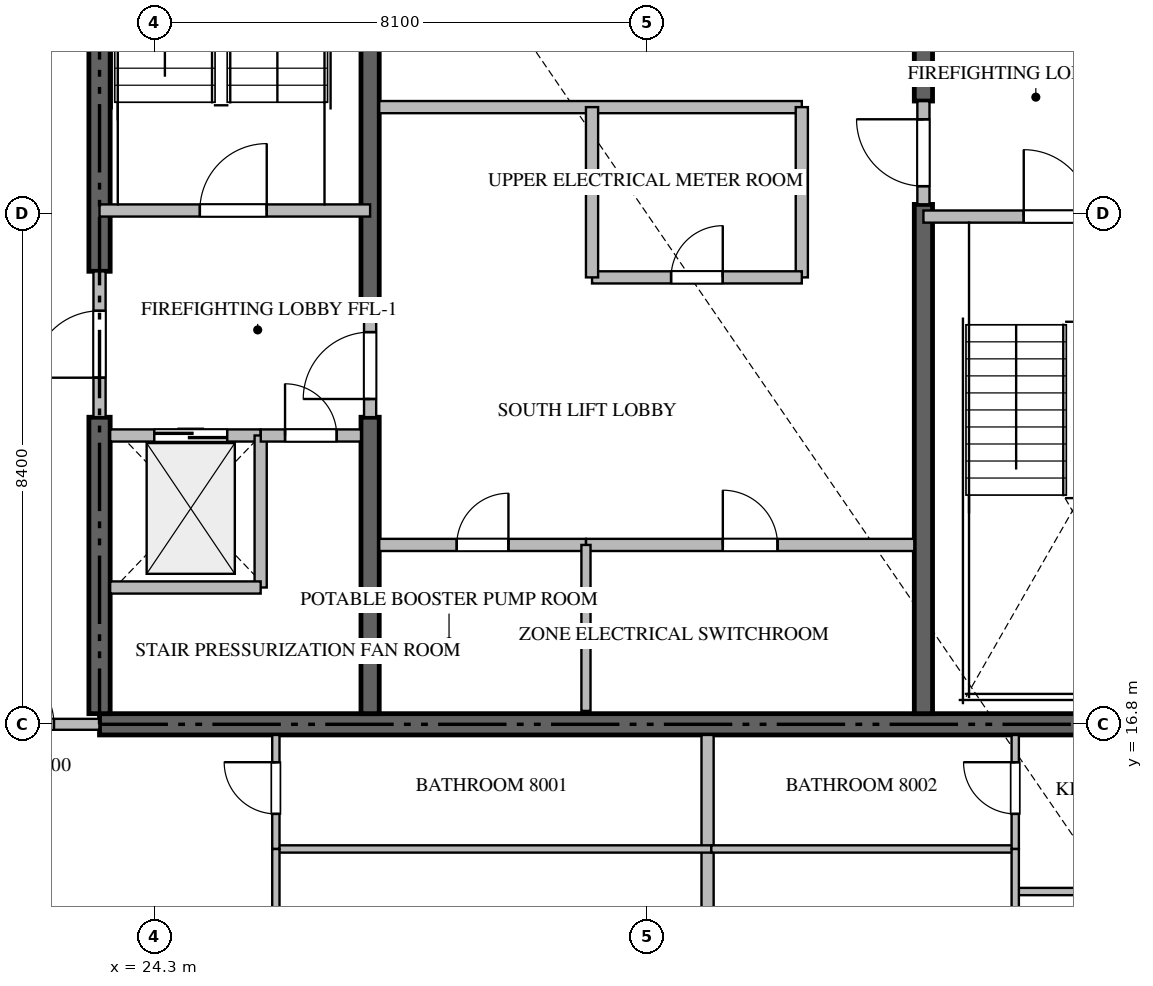
"""IFC4 building model, lengths in metres.
Left out: names, types, materials, properties, quantities, classifications, styles, units other than length and angle.
Written with IfcOpenShell. Run it as: python <this file> out.ifc"""

import sys

from ifc_helpers import new_model, si_unit, direction, frame, frame_2d, origin, place, context, subcontext, project, spatial, rectangle, extrude, source, transform, mapped, element, fill, save


model = new_model("IFC4")
c1 = context("Model", 3, precision=1e-05, world=origin(), true_north=direction((0.0, 1.0)))
c2 = subcontext(c1, "Body", "Model", "MODEL_VIEW")
j1 = project(units=[si_unit("LENGTHUNIT", "METRE"), si_unit("PLANEANGLEUNIT", "RADIAN")], contexts=[c1])
p1 = place(None, origin())
s1 = spatial("IfcSite", under=j1, at=p1, CompositionType="ELEMENT")
p2 = place(p1, origin())
s2 = spatial("IfcBuilding", under=s1, at=p2, CompositionType="ELEMENT")
p3 = place(p2, frame((0.0, 0.0, 321.8)))
s3 = spatial("IfcBuildingStorey", under=s2, at=p3, CompositionType="ELEMENT", Elevation=321.8)
p4 = place(p3, frame((23.4, 16.8, -0.26), z_axis=(0.0, 0.0, 1.0), x_axis=(1.0, 0.0, 0.0)))
e1 = element("IfcWall", 1, at=p4, inside=s3, PredefinedType="SHEAR", context=c2, shape_type="SweptSolid", body=[
    extrude(rectangle(XDim=18.0, YDim=0.35, at=frame_2d((9.0, 0.0))), origin(), (0.0, 0.0, 1.0), 4.048),
])
p5 = place(p3, frame((23.4, 16.975, -0.26), z_axis=(0.0, 0.0, 1.0), x_axis=(0.0, 1.0, 0.0)))
e2 = element("IfcWall", 2, at=p5, inside=s3, PredefinedType="SHEAR", context=c2, shape_type="SweptSolid", body=[
    extrude(rectangle(XDim=4.875, YDim=0.35, at=frame_2d((2.438, 0.0))), origin(), (0.0, 0.0, 1.0), 4.048),
])
p6 = place(p3, frame((23.4, 24.25, -0.26), z_axis=(0.0, 0.0, 1.0), x_axis=(0.0, 1.0, 0.0)))
e3 = element("IfcWall", 3, at=p6, inside=s3, PredefinedType="SHEAR", context=c2, shape_type="SweptSolid", body=[
    extrude(rectangle(XDim=9.175, YDim=0.35, at=frame_2d((4.587, 0.0))), origin(), (0.0, 0.0, 1.0), 4.048),
])
p7 = place(p3, frame((27.85, 16.975, -0.26), z_axis=(0.0, 0.0, 1.0), x_axis=(0.0, 1.0, 0.0)))
e4 = element("IfcWall", 4, at=p7, inside=s3, PredefinedType="SHEAR", context=c2, shape_type="SweptSolid", body=[
    extrude(rectangle(XDim=4.875, YDim=0.3, at=frame_2d((2.438, 0.0))), origin(), (0.0, 0.0, 1.0), 4.048),
])
p8 = place(p3, frame((27.85, 23.55, -0.26), z_axis=(0.0, 0.0, 1.0), x_axis=(0.0, 1.0, 0.0)))
e5 = element("IfcWall", 5, at=p8, inside=s3, PredefinedType="SHEAR", context=c2, shape_type="SweptSolid", body=[
    extrude(rectangle(XDim=9.875, YDim=0.3, at=frame_2d((4.938, 0.0))), origin(), (0.0, 0.0, 1.0), 4.048),
])
p9 = place(p3, frame((36.95, 16.975, -0.26), z_axis=(0.0, 0.0, 1.0), x_axis=(0.0, 1.0, 0.0)))
e6 = element("IfcWall", 6, at=p9, inside=s3, PredefinedType="SHEAR", context=c2, shape_type="SweptSolid", body=[
    extrude(rectangle(XDim=8.375, YDim=0.3, at=frame_2d((4.188, 0.0))), origin(), (0.0, 0.0, 1.0), 4.048),
])
p10 = place(p3, frame((36.95, 27.05, -0.26), z_axis=(0.0, 0.0, 1.0), x_axis=(0.0, 1.0, 0.0)))
e7 = element("IfcWall", 7, at=p10, inside=s3, PredefinedType="SHEAR", context=c2, shape_type="SweptSolid", body=[
    extrude(rectangle(XDim=6.375, YDim=0.3, at=frame_2d((3.188, 0.0))), origin(), (0.0, 0.0, 1.0), 4.048),
])
p11 = place(p3, frame((23.4, 25.25, 0.0), z_axis=(0.0, 0.0, 1.0), x_axis=(1.0, 0.0, 0.0)))
e8 = element("IfcWall", 8, at=p11, inside=s3, PredefinedType="STANDARD", context=c2, shape_type="SweptSolid", body=[
    extrude(rectangle(XDim=4.45, YDim=0.2, at=frame_2d((2.225, 0.0))), origin(), (0.0, 0.0, 1.0), 3.79),
])
p12 = place(p11, frame((1.65, 0.0, 0.0)))
e9 = element("IfcOpeningElement", 9, at=p12, cuts=e8, PredefinedType="OPENING", context=c2, shape_type="SweptSolid", body=[
    extrude(rectangle(XDim=1.1, YDim=2.15, at=frame_2d((0.55, 1.075))), frame((0.0, 0.11, 0.0), z_axis=(0.0, -1.0, 0.0), x_axis=(1.0, 0.0, 0.0)), (0.0, 0.0, 1.0), 0.22),
])
p13 = place(p3, frame((36.95, 25.15, 0.0), z_axis=(0.0, 0.0, 1.0), x_axis=(1.0, 0.0, 0.0)))
e10 = element("IfcWall", 10, at=p13, inside=s3, PredefinedType="STANDARD", context=c2, shape_type="SweptSolid", body=[
    extrude(rectangle(XDim=4.45, YDim=0.2, at=frame_2d((2.225, 0.0))), origin(), (0.0, 0.0, 1.0), 3.79),
])
p14 = place(p13, frame((1.65, 0.0, 0.0)))
e11 = element("IfcOpeningElement", 11, at=p14, cuts=e10, PredefinedType="OPENING", context=c2, shape_type="SweptSolid", body=[
    extrude(rectangle(XDim=1.1, YDim=2.15, at=frame_2d((0.55, 1.075))), frame((0.0, 0.11, 0.0), z_axis=(0.0, -1.0, 0.0), x_axis=(1.0, 0.0, 0.0)), (0.0, 0.0, 1.0), 0.22),
])
p15 = place(p3, frame((23.575, 21.55, 0.0), z_axis=(0.0, 0.0, 1.0), x_axis=(1.0, 0.0, 0.0)))
e12 = element("IfcWall", 12, at=p15, inside=s3, PredefinedType="STANDARD", context=c2, shape_type="SweptSolid", body=[
    extrude(rectangle(XDim=2.475, YDim=0.2, at=frame_2d((1.238, 0.0))), origin(), (0.0, 0.0, 1.0), 3.79),
])
p16 = place(p15, frame((0.725, 0.0, 0.0)))
e13 = element("IfcOpeningElement", 13, at=p16, cuts=e12, PredefinedType="OPENING", context=c2, shape_type="SweptSolid", body=[
    extrude(rectangle(XDim=1.2, YDim=2.2, at=frame_2d((0.6, 1.1))), frame((0.0, 0.11, 0.0), z_axis=(0.0, -1.0, 0.0), x_axis=(1.0, 0.0, 0.0)), (0.0, 0.0, 1.0), 0.22),
])
p17 = place(p3, frame((26.05, 19.05, 0.0), z_axis=(0.0, 0.0, 1.0), x_axis=(0.0, 1.0, 0.0)))
e14 = element("IfcWall", 14, at=p17, inside=s3, PredefinedType="STANDARD", context=c2, shape_type="SweptSolid", body=[
    extrude(rectangle(XDim=2.5, YDim=0.2, at=frame_2d((1.25, 0.0))), origin(), (0.0, 0.0, 1.0), 3.79),
])
p18 = place(p3, frame((23.575, 19.05, 0.0), z_axis=(0.0, 0.0, 1.0), x_axis=(1.0, 0.0, 0.0)))
e15 = element("IfcWall", 15, at=p18, inside=s3, PredefinedType="STANDARD", context=c2, shape_type="SweptSolid", body=[
    extrude(rectangle(XDim=2.475, YDim=0.2, at=frame_2d((1.238, 0.0))), origin(), (0.0, 0.0, 1.0), 3.79),
])
p19 = place(p3, frame((26.052, 21.55, 0.0), z_axis=(0.0, 0.0, 1.0), x_axis=(1.0, 0.0, 0.0)))
e16 = element("IfcWall", 16, at=p19, inside=s3, PredefinedType="STANDARD", context=c2, shape_type="SweptSolid", body=[
    extrude(rectangle(XDim=1.648, YDim=0.2, at=frame_2d((0.824, 0.0))), origin(), (0.0, 0.0, 1.0), 3.79),
])
p20 = place(p19, frame((0.399, 0.0, 0.0)))
e17 = element("IfcOpeningElement", 17, at=p20, cuts=e16, PredefinedType="OPENING", context=c2, shape_type="SweptSolid", body=[
    extrude(rectangle(XDim=0.85, YDim=2.1, at=frame_2d((0.425, 1.05))), frame((0.0, 0.11, 0.0), z_axis=(0.0, -1.0, 0.0), x_axis=(1.0, 0.0, 0.0)), (0.0, 0.0, 1.0), 0.22),
])
p21 = place(p3, frame((23.4, 21.852, 0.0), z_axis=(0.0, 0.0, 1.0), x_axis=(0.0, 1.0, 0.0)))
e18 = element("IfcWall", 18, at=p21, inside=s3, PredefinedType="STANDARD", context=c2, shape_type="SweptSolid", body=[
    extrude(rectangle(XDim=2.396, YDim=0.2, at=frame_2d((1.198, 0.0))), origin(), (0.0, 0.0, 1.0), 3.79),
])
p22 = place(p21, frame((0.648, 0.0, 0.0)))
e19 = element("IfcOpeningElement", 19, at=p22, cuts=e18, PredefinedType="OPENING", context=c2, shape_type="SweptSolid", body=[
    extrude(rectangle(XDim=1.1, YDim=2.15, at=frame_2d((0.55, 1.075))), frame((0.0, 0.11, 0.0), z_axis=(0.0, -1.0, 0.0), x_axis=(1.0, 0.0, 0.0)), (0.0, 0.0, 1.0), 0.22),
])
p23 = place(p3, frame((27.85, 21.852, 0.0), z_axis=(0.0, 0.0, 1.0), x_axis=(0.0, 1.0, 0.0)))
e20 = element("IfcWall", 20, at=p23, inside=s3, PredefinedType="STANDARD", context=c2, shape_type="SweptSolid", body=[
    extrude(rectangle(XDim=1.696, YDim=0.2, at=frame_2d((0.848, 0.0))), origin(), (0.0, 0.0, 1.0), 3.79),
])
p24 = place(p23, frame((0.298, 0.0, 0.0)))
e21 = element("IfcOpeningElement", 21, at=p24, cuts=e20, PredefinedType="OPENING", context=c2, shape_type="SweptSolid", body=[
    extrude(rectangle(XDim=1.1, YDim=2.15, at=frame_2d((0.55, 1.075))), frame((0.0, 0.11, 0.0), z_axis=(0.0, -1.0, 0.0), x_axis=(1.0, 0.0, 0.0)), (0.0, 0.0, 1.0), 0.22),
])
p25 = place(p3, frame((36.95, 25.352, 0.0), z_axis=(0.0, 0.0, 1.0), x_axis=(0.0, 1.0, 0.0)))
e22 = element("IfcWall", 22, at=p25, inside=s3, PredefinedType="STANDARD", context=c2, shape_type="SweptSolid", body=[
    extrude(rectangle(XDim=1.696, YDim=0.2, at=frame_2d((0.848, 0.0))), origin(), (0.0, 0.0, 1.0), 3.79),
])
p26 = place(p25, frame((0.298, 0.0, 0.0)))
e23 = element("IfcOpeningElement", 23, at=p26, cuts=e22, PredefinedType="OPENING", context=c2, shape_type="SweptSolid", body=[
    extrude(rectangle(XDim=1.1, YDim=2.15, at=frame_2d((0.55, 1.075))), frame((0.0, 0.11, 0.0), z_axis=(0.0, -1.0, 0.0), x_axis=(1.0, 0.0, 0.0)), (0.0, 0.0, 1.0), 0.22),
])
p27 = place(p3, frame((28.0, 19.75, 0.0), z_axis=(0.0, 0.0, 1.0), x_axis=(1.0, 0.0, 0.0)))
e24 = element("IfcWall", 24, at=p27, inside=s3, PredefinedType="STANDARD", context=c2, shape_type="SweptSolid", body=[
    extrude(rectangle(XDim=3.4, YDim=0.2, at=frame_2d((1.7, 0.0))), origin(), (0.0, 0.0, 1.0), 3.79),
])
p28 = place(p27, frame((1.275, 0.0, 0.0)))
e25 = element("IfcOpeningElement", 25, at=p28, cuts=e24, PredefinedType="OPENING", context=c2, shape_type="SweptSolid", body=[
    extrude(rectangle(XDim=0.85, YDim=2.1, at=frame_2d((0.425, 1.05))), frame((0.0, 0.11, 0.0), z_axis=(0.0, -1.0, 0.0), x_axis=(1.0, 0.0, 0.0)), (0.0, 0.0, 1.0), 0.22),
])
p29 = place(p3, frame((31.402, 19.75, 0.0), z_axis=(0.0, 0.0, 1.0), x_axis=(1.0, 0.0, 0.0)))
e26 = element("IfcWall", 26, at=p29, inside=s3, PredefinedType="STANDARD", context=c2, shape_type="SweptSolid", body=[
    extrude(rectangle(XDim=5.398, YDim=0.2, at=frame_2d((2.699, 0.0))), origin(), (0.0, 0.0, 1.0), 3.79),
])
p30 = place(p29, frame((2.249, 0.0, 0.0)))
e27 = element("IfcOpeningElement", 27, at=p30, cuts=e26, PredefinedType="OPENING", context=c2, shape_type="SweptSolid", body=[
    extrude(rectangle(XDim=0.9, YDim=2.1, at=frame_2d((0.45, 1.05))), frame((0.0, 0.11, 0.0), z_axis=(0.0, -1.0, 0.0), x_axis=(1.0, 0.0, 0.0)), (0.0, 0.0, 1.0), 0.22),
])
p31 = place(p3, frame((31.4, 17.02, 0.0), z_axis=(0.0, 0.0, 1.0), x_axis=(0.0, 1.0, 0.0)))
e28 = element("IfcWall", 28, at=p31, inside=s3, PredefinedType="PARTITIONING", context=c2, shape_type="SweptSolid", body=[
    extrude(rectangle(XDim=2.73, YDim=0.15, at=frame_2d((1.365, 0.0))), origin(), (0.0, 0.0, 1.0), 3.79),
])
p32 = place(p3, frame((28.0, 26.95, 0.0), z_axis=(0.0, 0.0, 1.0), x_axis=(1.0, 0.0, 0.0)))
e29 = element("IfcWall", 29, at=p32, inside=s3, PredefinedType="STANDARD", context=c2, shape_type="SweptSolid", body=[
    extrude(rectangle(XDim=6.95, YDim=0.2, at=frame_2d((3.475, 0.0))), origin(), (0.0, 0.0, 1.0), 3.79),
])
p33 = place(p3, frame((34.95, 24.15, 0.0), z_axis=(0.0, 0.0, 1.0), x_axis=(0.0, 1.0, 0.0)))
e30 = element("IfcWall", 30, at=p33, inside=s3, PredefinedType="STANDARD", context=c2, shape_type="SweptSolid", body=[
    extrude(rectangle(XDim=2.8, YDim=0.2, at=frame_2d((1.4, 0.0))), origin(), (0.0, 0.0, 1.0), 3.79),
])
p34 = place(p3, frame((31.5, 24.15, 0.0), z_axis=(0.0, 0.0, 1.0), x_axis=(1.0, 0.0, 0.0)))
e31 = element("IfcWall", 31, at=p34, inside=s3, PredefinedType="STANDARD", context=c2, shape_type="SweptSolid", body=[
    extrude(rectangle(XDim=3.45, YDim=0.2, at=frame_2d((1.725, 0.0))), origin(), (0.0, 0.0, 1.0), 3.79),
])
p35 = place(p34, frame((1.3, 0.0, 0.0)))
e32 = element("IfcOpeningElement", 32, at=p35, cuts=e31, PredefinedType="OPENING", context=c2, shape_type="SweptSolid", body=[
    extrude(rectangle(XDim=0.85, YDim=2.1, at=frame_2d((0.425, 1.05))), frame((0.0, 0.11, 0.0), z_axis=(0.0, -1.0, 0.0), x_axis=(1.0, 0.0, 0.0)), (0.0, 0.0, 1.0), 0.22),
])
p36 = place(p3, frame((31.5, 24.15, 0.0), z_axis=(0.0, 0.0, 1.0), x_axis=(0.0, 1.0, 0.0)))
e33 = element("IfcWall", 33, at=p36, inside=s3, PredefinedType="STANDARD", context=c2, shape_type="SweptSolid", body=[
    extrude(rectangle(XDim=2.8, YDim=0.2, at=frame_2d((1.4, 0.0))), origin(), (0.0, 0.0, 1.0), 3.79),
])
p37 = place(p3, frame((33.4, 2.482, 0.0), z_axis=(0.0, 0.0, 1.0), x_axis=(0.0, 1.0, 0.0)))
e34 = element("IfcWall", 34, at=p37, inside=s3, PredefinedType="PARTITIONING", context=c2, shape_type="SweptSolid", body=[
    extrude(rectangle(XDim=14.143, YDim=0.2, at=frame_2d((7.072, 0.0))), origin(), (0.0, 0.0, 1.0), 3.79),
])
p38 = place(p3, frame((20.902, 16.8, 0.0), z_axis=(0.0, 0.0, 1.0), x_axis=(1.0, 0.0, 0.0)))
e35 = element("IfcWall", 35, at=p38, inside=s3, PredefinedType="PARTITIONING", context=c2, shape_type="SweptSolid", body=[
    extrude(rectangle(XDim=2.496, YDim=0.18, at=frame_2d((1.248, 0.0))), origin(), (0.0, 0.0, 1.0), 3.79),
])
p39 = place(p38, frame((0.748, 0.0, 0.0)))
e36 = element("IfcOpeningElement", 36, at=p39, cuts=e35, PredefinedType="OPENING", context=c2, shape_type="SweptSolid", body=[
    extrude(rectangle(XDim=1.0, YDim=2.15, at=frame_2d((0.5, 1.075))), frame((0.0, 0.1, 0.0), z_axis=(0.0, -1.0, 0.0), x_axis=(1.0, 0.0, 0.0)), (0.0, 0.0, 1.0), 0.2),
])
p40 = place(p3, frame((26.3, 14.75, 0.0), z_axis=(0.0, 0.0, 1.0), x_axis=(1.0, 0.0, 0.0)))
e37 = element("IfcWall", 37, at=p40, inside=s3, PredefinedType="PARTITIONING", context=c2, shape_type="SweptSolid", body=[
    extrude(rectangle(XDim=7.16, YDim=0.12, at=frame_2d((3.58, 0.0))), origin(), (0.0, 0.0, 1.0), 3.79),
])
p41 = place(p3, frame((26.3, 6.78, 0.0), z_axis=(0.0, 0.0, 1.0), x_axis=(0.0, 1.0, 0.0)))
e38 = element("IfcWall", 38, at=p41, inside=s3, PredefinedType="PARTITIONING", context=c2, shape_type="SweptSolid", body=[
    extrude(rectangle(XDim=7.97, YDim=0.12, at=frame_2d((3.985, 0.0))), origin(), (0.0, 0.0, 1.0), 3.79),
])
p42 = place(p41, frame((3.56, 0.0, 0.0)))
e39 = element("IfcOpeningElement", 39, at=p42, cuts=e38, PredefinedType="OPENING", context=c2, shape_type="SweptSolid", body=[
    extrude(rectangle(XDim=0.85, YDim=2.1, at=frame_2d((0.425, 1.05))), frame((0.0, 0.07, 0.0), z_axis=(0.0, -1.0, 0.0), x_axis=(1.0, 0.0, 0.0)), (0.0, 0.0, 1.0), 0.14),
])
p43 = place(p3, frame((26.3, 14.752, 0.0), z_axis=(0.0, 0.0, 1.0), x_axis=(0.0, 1.0, 0.0)))
e40 = element("IfcWall", 40, at=p43, inside=s3, PredefinedType="PARTITIONING", context=c2, shape_type="SweptSolid", body=[
    extrude(rectangle(XDim=1.873, YDim=0.12, at=frame_2d((0.937, 0.0))), origin(), (0.0, 0.0, 1.0), 3.79),
])
p44 = place(p43, frame((0.575, 0.0, 0.0)))
e41 = element("IfcOpeningElement", 41, at=p44, cuts=e40, PredefinedType="OPENING", context=c2, shape_type="SweptSolid", body=[
    extrude(rectangle(XDim=0.85, YDim=2.1, at=frame_2d((0.425, 1.05))), frame((0.0, 0.07, 0.0), z_axis=(0.0, -1.0, 0.0), x_axis=(1.0, 0.0, 0.0)), (0.0, 0.0, 1.0), 0.14),
])
p45 = place(p3, frame((38.46, 14.05, 0.0), z_axis=(0.0, 0.0, 1.0), x_axis=(1.0, 0.0, 0.0)))
e42 = element("IfcWall", 42, at=p45, inside=s3, PredefinedType="PARTITIONING", context=c2, shape_type="SweptSolid", body=[
    extrude(rectangle(XDim=2.85, YDim=0.12, at=frame_2d((1.425, 0.0))), origin(), (0.0, 0.0, 1.0), 3.79),
])
p46 = place(p45, frame((1.0, 0.0, 0.0)))
e43 = element("IfcOpeningElement", 43, at=p46, cuts=e42, PredefinedType="OPENING", context=c2, shape_type="SweptSolid", body=[
    extrude(rectangle(XDim=0.85, YDim=2.1, at=frame_2d((0.425, 1.05))), frame((0.0, 0.07, 0.0), z_axis=(0.0, -1.0, 0.0), x_axis=(1.0, 0.0, 0.0)), (0.0, 0.0, 1.0), 0.14),
])
p47 = place(p3, frame((33.462, 14.75, 0.0), z_axis=(0.0, 0.0, 1.0), x_axis=(1.0, 0.0, 0.0)))
e44 = element("IfcWall", 44, at=p47, inside=s3, PredefinedType="PARTITIONING", context=c2, shape_type="SweptSolid", body=[
    extrude(rectangle(XDim=4.998, YDim=0.12, at=frame_2d((2.499, 0.0))), origin(), (0.0, 0.0, 1.0), 3.79),
])
p48 = place(p3, frame((38.46, 10.859, 0.0), z_axis=(0.0, 0.0, 1.0), x_axis=(0.0, 1.0, 0.0)))
e45 = element("IfcWall", 45, at=p48, inside=s3, PredefinedType="PARTITIONING", context=c2, shape_type="SweptSolid", body=[
    extrude(rectangle(XDim=3.891, YDim=0.12, at=frame_2d((1.946, 0.0))), origin(), (0.0, 0.0, 1.0), 3.79),
])
p49 = place(p48, frame((1.52, 0.0, 0.0)))
e46 = element("IfcOpeningElement", 46, at=p49, cuts=e45, PredefinedType="OPENING", context=c2, shape_type="SweptSolid", body=[
    extrude(rectangle(XDim=0.85, YDim=2.1, at=frame_2d((0.425, 1.05))), frame((0.0, 0.07, 0.0), z_axis=(0.0, -1.0, 0.0), x_axis=(1.0, 0.0, 0.0)), (0.0, 0.0, 1.0), 0.14),
])
p50 = place(p3, frame((38.46, 14.752, 0.0), z_axis=(0.0, 0.0, 1.0), x_axis=(0.0, 1.0, 0.0)))
e47 = element("IfcWall", 47, at=p50, inside=s3, PredefinedType="PARTITIONING", context=c2, shape_type="SweptSolid", body=[
    extrude(rectangle(XDim=1.873, YDim=0.12, at=frame_2d((0.937, 0.0))), origin(), (0.0, 0.0, 1.0), 3.79),
])
p51 = place(p50, frame((0.575, 0.0, 0.0)))
e48 = element("IfcOpeningElement", 48, at=p51, cuts=e47, PredefinedType="OPENING", context=c2, shape_type="SweptSolid", body=[
    extrude(rectangle(XDim=0.85, YDim=2.1, at=frame_2d((0.425, 1.05))), frame((0.0, 0.07, 0.0), z_axis=(0.0, -1.0, 0.0), x_axis=(1.0, 0.0, 0.0)), (0.0, 0.0, 1.0), 0.14),
])
m1 = source(origin(), c2, "Body", "SweptSolid", [
    extrude(rectangle(XDim=1.1, YDim=2.15, at=frame_2d((0.55, 1.075))), frame((0.0, 0.025, 0.0), z_axis=(0.0, -1.0, 0.0), x_axis=(1.0, 0.0, 0.0)), (0.0, 0.0, 1.0), 0.05),
])
p52 = place(p12, origin())
e49 = element("IfcDoor", 49, at=p52, inside=s3, OperationType="SINGLE_SWING_RIGHT", PredefinedType="DOOR", context=c2, shape_type="MappedRepresentation", body=[
    mapped(m1, transform((0.0, 0.0, 0.0), scale=1.0)),
])
fill(e9, e49)
p53 = place(p14, origin())
e50 = element("IfcDoor", 50, at=p53, inside=s3, OperationType="SINGLE_SWING_LEFT", PredefinedType="DOOR", context=c2, shape_type="MappedRepresentation", body=[
    mapped(m1, transform((0.0, 0.0, 0.0), scale=1.0)),
])
fill(e11, e50)
m2 = source(origin(), c2, "Body", "SweptSolid", [
    extrude(rectangle(XDim=1.2, YDim=2.2, at=frame_2d((0.6, 1.1))), frame((0.0, 0.025, 0.0), z_axis=(0.0, -1.0, 0.0), x_axis=(1.0, 0.0, 0.0)), (0.0, 0.0, 1.0), 0.05),
])
p54 = place(p16, origin())
e51 = element("IfcDoor", 51, at=p54, inside=s3, OperationType="DOUBLE_DOOR_SLIDING", PredefinedType="DOOR", context=c2, shape_type="MappedRepresentation", body=[
    mapped(m2, transform((0.0, 0.0, 0.0), scale=1.0)),
])
fill(e13, e51)
m3 = source(origin(), c2, "Body", "SweptSolid", [
    extrude(rectangle(XDim=0.85, YDim=2.1, at=frame_2d((0.425, 1.05))), frame((0.0, 0.025, 0.0), z_axis=(0.0, -1.0, 0.0), x_axis=(1.0, 0.0, 0.0)), (0.0, 0.0, 1.0), 0.05),
])
p55 = place(p20, origin())
e52 = element("IfcDoor", 52, at=p55, inside=s3, OperationType="SINGLE_SWING_LEFT", PredefinedType="DOOR", context=c2, shape_type="MappedRepresentation", body=[
    mapped(m3, transform((0.0, 0.0, 0.0), scale=1.0)),
])
fill(e17, e52)
p56 = place(p22, origin())
e53 = element("IfcDoor", 53, at=p56, inside=s3, OperationType="SINGLE_SWING_LEFT", PredefinedType="DOOR", context=c2, shape_type="MappedRepresentation", body=[
    mapped(m1, transform((0.0, 0.0, 0.0), scale=1.0)),
])
fill(e19, e53)
p57 = place(p24, origin())
e54 = element("IfcDoor", 54, at=p57, inside=s3, OperationType="SINGLE_SWING_LEFT", PredefinedType="DOOR", context=c2, shape_type="MappedRepresentation", body=[
    mapped(m1, transform((0.0, 0.0, 0.0), scale=1.0)),
])
fill(e21, e54)
p58 = place(p26, origin())
e55 = element("IfcDoor", 55, at=p58, inside=s3, OperationType="SINGLE_SWING_RIGHT", PredefinedType="DOOR", context=c2, shape_type="MappedRepresentation", body=[
    mapped(m1, transform((0.0, 0.0, 0.0), scale=1.0)),
])
fill(e23, e55)
p59 = place(p28, origin())
e56 = element("IfcDoor", 56, at=p59, inside=s3, OperationType="SINGLE_SWING_RIGHT", PredefinedType="DOOR", context=c2, shape_type="MappedRepresentation", body=[
    mapped(m3, transform((0.0, 0.0, 0.0), scale=1.0)),
])
fill(e25, e56)
m4 = source(origin(), c2, "Body", "SweptSolid", [
    extrude(rectangle(XDim=0.9, YDim=2.1, at=frame_2d((0.45, 1.05))), frame((0.0, 0.025, 0.0), z_axis=(0.0, -1.0, 0.0), x_axis=(1.0, 0.0, 0.0)), (0.0, 0.0, 1.0), 0.05),
])
p60 = place(p30, origin())
e57 = element("IfcDoor", 57, at=p60, inside=s3, OperationType="SINGLE_SWING_LEFT", PredefinedType="DOOR", context=c2, shape_type="MappedRepresentation", body=[
    mapped(m4, transform((0.0, 0.0, 0.0), scale=1.0)),
])
fill(e27, e57)
p61 = place(p35, origin())
e58 = element("IfcDoor", 58, at=p61, inside=s3, OperationType="SINGLE_SWING_RIGHT", PredefinedType="DOOR", context=c2, shape_type="MappedRepresentation", body=[
    mapped(m3, transform((0.0, 0.0, 0.0), scale=1.0)),
])
fill(e32, e58)
m5 = source(origin(), c2, "Body", "SweptSolid", [
    extrude(rectangle(XDim=1.0, YDim=2.15, at=frame_2d((0.5, 1.075))), frame((0.0, 0.025, 0.0), z_axis=(0.0, -1.0, 0.0), x_axis=(1.0, 0.0, 0.0)), (0.0, 0.0, 1.0), 0.05),
])
p62 = place(p39, origin())
e59 = element("IfcDoor", 59, at=p62, inside=s3, OperationType="SINGLE_SWING_LEFT", PredefinedType="DOOR", context=c2, shape_type="MappedRepresentation", body=[
    mapped(m5, transform((0.0, 0.0, 0.0), scale=1.0)),
])
fill(e36, e59)
p63 = place(p44, origin())
e60 = element("IfcDoor", 60, at=p63, inside=s3, OperationType="SINGLE_SWING_RIGHT", PredefinedType="DOOR", context=c2, shape_type="MappedRepresentation", body=[
    mapped(m3, transform((0.0, 0.0, 0.0), scale=1.0)),
])
fill(e41, e60)
p64 = place(p51, origin())
e61 = element("IfcDoor", 61, at=p64, inside=s3, OperationType="SINGLE_SWING_RIGHT", PredefinedType="DOOR", context=c2, shape_type="MappedRepresentation", body=[
    mapped(m3, transform((0.0, 0.0, 0.0), scale=1.0)),
])
fill(e48, e61)
save(model, sys.argv[1])
